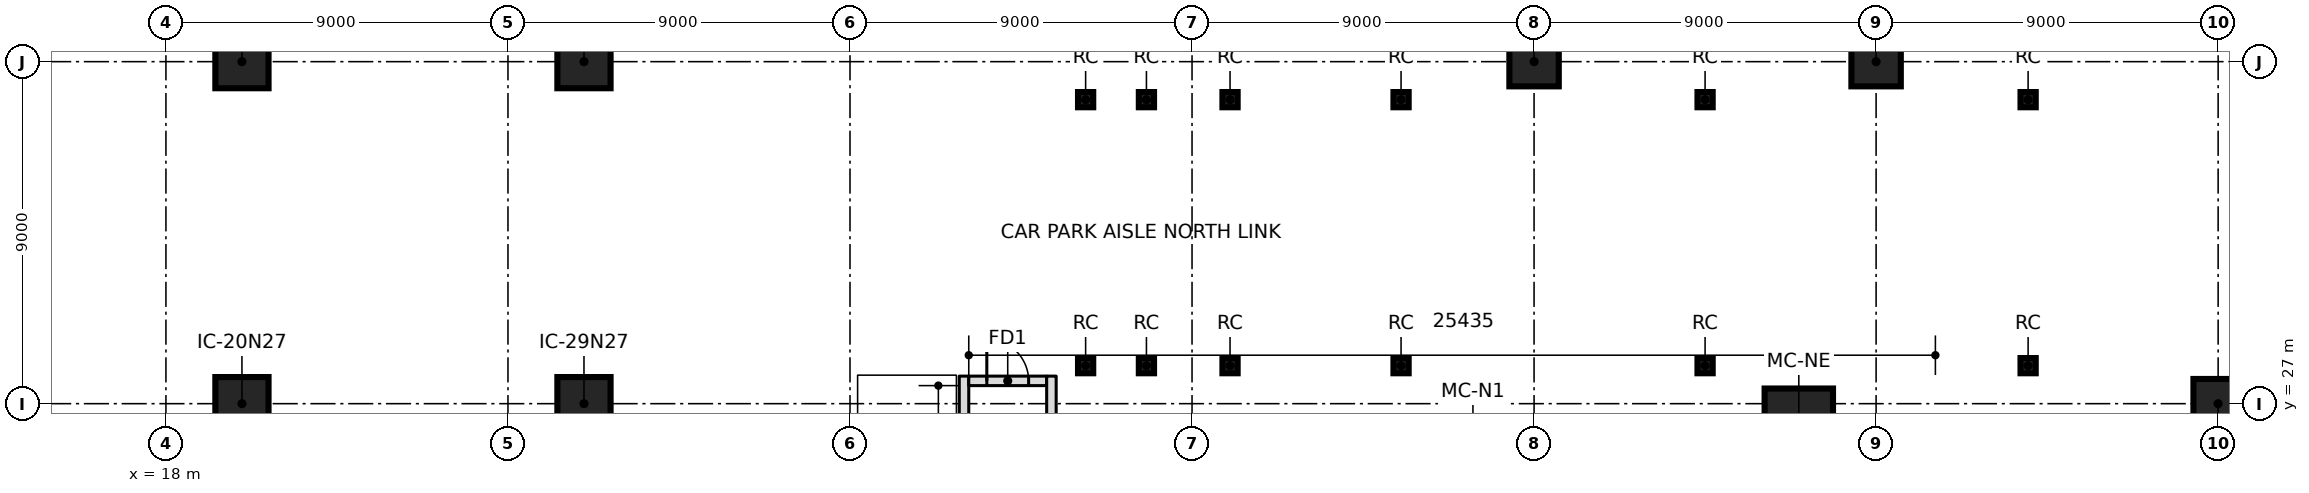
"""IFC4 building model, lengths in metres.
Left out: names, types, materials, properties, quantities, classifications, styles, units other than length and angle.
Written with IfcOpenShell. Run it as: python <this file> out.ifc"""

import sys

from ifc_helpers import new_model, si_unit, direction, frame, frame_2d, origin, origin_2d, place, context, subcontext, project, spatial, polyline, rectangle, outline, extrude, element, fill, save


model = new_model("IFC4")
c1 = context("Model", 3, precision=1e-05, world=origin(), true_north=direction((0.0, 1.0)))
c2 = subcontext(c1, "Body", "Model", "MODEL_VIEW")
j1 = project(units=[si_unit("LENGTHUNIT", "METRE"), si_unit("PLANEANGLEUNIT", "RADIAN")], contexts=[c1])
p1 = place(None, origin())
s1 = spatial("IfcSite", under=j1, at=p1, CompositionType="ELEMENT")
p2 = place(p1, origin())
s2 = spatial("IfcBuilding", under=s1, at=p2, CompositionType="ELEMENT")
p3 = place(p2, frame((0.0, 0.0, -10.0)))
s3 = spatial("IfcBuildingStorey", under=s2, at=p3, CompositionType="ELEMENT", Elevation=-10.0)
p4 = place(p3, frame((60.966, 26.499, -0.3), z_axis=(0.0, 0.0, 1.0), x_axis=(1.0, 0.0, 0.0)))
e1 = element("IfcColumn", 1, at=p4, inside=s3, PredefinedType="COLUMN", context=c2, shape_type="SweptSolid", body=[
    extrude(rectangle(XDim=1.8, YDim=1.8, at=origin_2d()), origin(), (0.0, 0.0, 1.0), 5.3),
])
for number, where, z_axis, x_axis in (
    (2, (20.0, 27.0, -0.3), (0.0, 0.0, 1.0), (1.0, 0.0, 0.0)),
    (3, (20.0, 36.0, -0.3), (0.0, 0.0, 1.0), (1.0, 0.0, 0.0)),
    (4, (29.0, 27.0, -0.3), (0.0, 0.0, 1.0), (1.0, 0.0, 0.0)),
    (5, (29.0, 36.0, -0.3), (0.0, 0.0, 1.0), (1.0, 0.0, 0.0)),
):
    element("IfcColumn", number, at=place(p3, frame(where, z_axis=z_axis, x_axis=x_axis)), inside=s3, PredefinedType="COLUMN", context=c2, shape_type="SweptSolid", body=[
        extrude(rectangle(XDim=1.4, YDim=1.4, at=origin_2d()), origin(), (0.0, 0.0, 1.0), 5.3),
    ])
for number, where, z_axis, x_axis in (
    (6, (54.0, 36.0, -0.3), (0.0, 0.0, 1.0), (1.0, 0.0, 0.0)),
    (7, (63.0, 36.0, -0.3), (0.0, 0.0, 1.0), (1.0, 0.0, 0.0)),
    (8, (72.0, 27.0, -0.3), (0.0, 0.0, 1.0), (1.0, 0.0, 0.0)),
):
    element("IfcColumn", number, at=place(p3, frame(where, z_axis=z_axis, x_axis=x_axis)), inside=s3, PredefinedType="COLUMN", context=c2, shape_type="SweptSolid", body=[
        extrude(rectangle(XDim=1.3, YDim=1.3, at=origin_2d()), origin(), (0.0, 0.0, 1.0), 5.3),
    ])
for number, where, z_axis, x_axis in (
    (9, (42.2, 28.0, -0.3), (0.0, 0.0, 1.0), (1.0, 0.0, 0.0)),
    (10, (42.2, 35.0, -0.3), (0.0, 0.0, 1.0), (1.0, 0.0, 0.0)),
):
    element("IfcColumn", number, at=place(p3, frame(where, z_axis=z_axis, x_axis=x_axis)), inside=s3, PredefinedType="COLUMN", context=c2, shape_type="SweptSolid", body=[
        extrude(rectangle(XDim=0.4, YDim=0.4, at=origin_2d()), origin(), (0.0, 0.0, 1.0), 4.908),
    ])
for number, where, z_axis, x_axis in (
    (11, (43.8, 28.0, -0.3), (0.0, 0.0, 1.0), (1.0, 0.0, 0.0)),
    (12, (43.8, 35.0, -0.3), (0.0, 0.0, 1.0), (1.0, 0.0, 0.0)),
):
    element("IfcColumn", number, at=place(p3, frame(where, z_axis=z_axis, x_axis=x_axis)), inside=s3, PredefinedType="COLUMN", context=c2, shape_type="SweptSolid", body=[
        extrude(rectangle(XDim=0.4, YDim=0.4, at=origin_2d()), origin(), (0.0, 0.0, 1.0), 5.042),
    ])
for number, where, z_axis, x_axis in (
    (13, (46.0, 28.0, -0.3), (0.0, 0.0, 1.0), (1.0, 0.0, 0.0)),
    (14, (46.0, 35.0, -0.3), (0.0, 0.0, 1.0), (1.0, 0.0, 0.0)),
):
    element("IfcColumn", number, at=place(p3, frame(where, z_axis=z_axis, x_axis=x_axis)), inside=s3, PredefinedType="COLUMN", context=c2, shape_type="SweptSolid", body=[
        extrude(rectangle(XDim=0.4, YDim=0.4, at=origin_2d()), origin(), (0.0, 0.0, 1.0), 5.337),
    ])
for number, where, z_axis, x_axis in (
    (15, (50.5, 28.0, -0.3), (0.0, 0.0, 1.0), (1.0, 0.0, 0.0)),
    (16, (50.5, 35.0, -0.3), (0.0, 0.0, 1.0), (1.0, 0.0, 0.0)),
    (17, (58.5, 28.0, -0.3), (0.0, 0.0, 1.0), (1.0, 0.0, 0.0)),
    (18, (58.5, 35.0, -0.3), (0.0, 0.0, 1.0), (1.0, 0.0, 0.0)),
    (19, (67.0, 28.0, -0.3), (0.0, 0.0, 1.0), (1.0, 0.0, 0.0)),
    (20, (67.0, 35.0, -0.3), (0.0, 0.0, 1.0), (1.0, 0.0, 0.0)),
):
    element("IfcColumn", number, at=place(p3, frame(where, z_axis=z_axis, x_axis=x_axis)), inside=s3, PredefinedType="COLUMN", context=c2, shape_type="SweptSolid", body=[
        extrude(rectangle(XDim=0.4, YDim=0.4, at=origin_2d()), origin(), (0.0, 0.0, 1.0), 5.3),
    ])
p5 = place(p3, frame((39.0, 14.375, 0.0), z_axis=(0.0, 0.0, 1.0), x_axis=(0.0, 1.0, 0.0)))
e21 = element("IfcWall", 21, at=p5, inside=s3, PredefinedType="PARTITIONING", context=c2, shape_type="SweptSolid", body=[
    extrude(rectangle(XDim=13.35, YDim=0.25, at=frame_2d((6.675, 0.0))), origin(), (0.0, 0.0, 1.0), 4.7),
])
p6 = place(p3, frame((39.125, 27.6, 0.0), z_axis=(0.0, 0.0, 1.0), x_axis=(1.0, 0.0, 0.0)))
e22 = element("IfcWall", 22, at=p6, inside=s3, PredefinedType="PARTITIONING", context=c2, shape_type="SweptSolid", body=[
    extrude(rectangle(XDim=2.05, YDim=0.25, at=frame_2d((1.025, 0.0))), origin(), (0.0, 0.0, 1.0), 4.7),
])
p7 = place(p6, frame((0.475, 0.0, 0.0)))
e23 = element("IfcOpeningElement", 23, at=p7, cuts=e22, PredefinedType="OPENING", context=c2, shape_type="SweptSolid", body=[
    extrude(rectangle(XDim=1.1, YDim=2.1, at=frame_2d((0.55, 1.05))), frame((0.0, 0.135, 0.0), z_axis=(0.0, -1.0, 0.0), x_axis=(1.0, 0.0, 0.0)), (0.0, 0.0, 1.0), 0.27),
])
p8 = place(p3, frame((41.3, 23.141, 0.0), z_axis=(0.0, 0.0, 1.0), x_axis=(0.0, 1.0, 0.0)))
e24 = element("IfcWall", 24, at=p8, inside=s3, PredefinedType="PARTITIONING", context=c2, shape_type="SweptSolid", body=[
    extrude(outline(polyline([(0.065, -0.125), (4.584, -0.125), (4.584, 0.125), (-0.065, 0.125), (0.065, -0.125)])), origin(), (0.0, 0.0, 1.0), 4.7),
])
p9 = place(p7, origin())
e25 = element("IfcDoor", 25, at=p9, inside=s3, OperationType="SINGLE_SWING_RIGHT", PredefinedType="DOOR", context=c2, shape_type="SweptSolid", body=[
    extrude(rectangle(XDim=1.1, YDim=2.1, at=frame_2d((0.55, 1.05))), frame((0.0, 0.025, 0.0), z_axis=(0.0, -1.0, 0.0), x_axis=(1.0, 0.0, 0.0)), (0.0, 0.0, 1.0), 0.05),
])
fill(e23, e25)
save(model, sys.argv[1])
